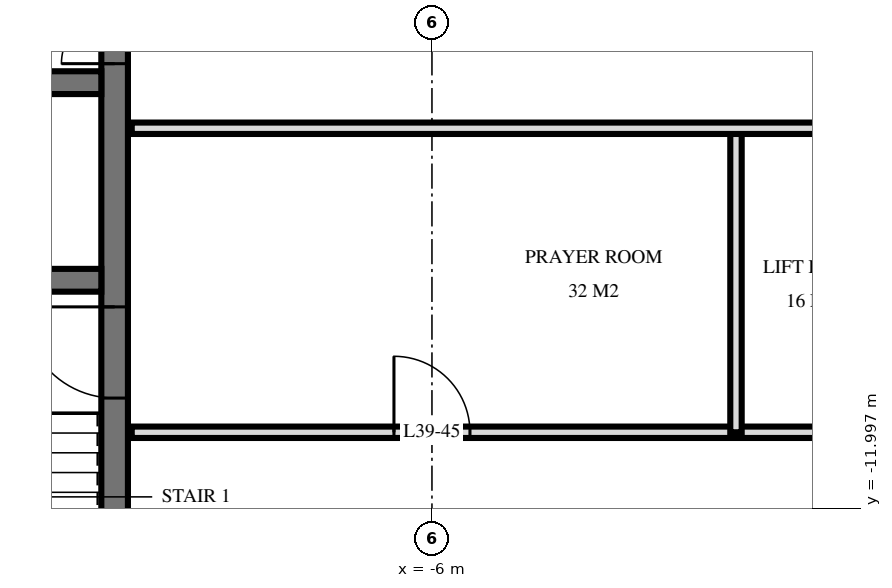
"""IFC4 building model, lengths in metres.
Left out: names, types, materials, properties, quantities, classifications, styles, units other than length and angle.
Written with IfcOpenShell. Run it as: python <this file> out.ifc"""

import sys

from ifc_helpers import new_model, si_unit, direction, frame, frame_2d, origin, place, context, subcontext, project, spatial, rectangle, extrude, element, fill, save


model = new_model("IFC4")
c1 = context("Model", 3, precision=1e-05, world=origin(), true_north=direction((0.0, 1.0)))
c2 = subcontext(c1, "Body", "Model", "MODEL_VIEW")
j1 = project(units=[si_unit("LENGTHUNIT", "METRE"), si_unit("PLANEANGLEUNIT", "RADIAN")], contexts=[c1])
p1 = place(None, origin())
s1 = spatial("IfcSite", under=j1, at=p1, CompositionType="ELEMENT")
p2 = place(p1, origin())
s2 = spatial("IfcBuilding", under=s1, at=p2, CompositionType="ELEMENT")
p3 = place(p2, frame((0.0, 0.0, 152.4)))
s3 = spatial("IfcBuildingStorey", under=s2, at=p3, CompositionType="ELEMENT", Elevation=152.4)
p4 = place(p3, frame((-10.175, -14.55, 0.0), z_axis=(0.0, 0.0, 1.0), x_axis=(0.0, 1.0, 0.0)))
e1 = element("IfcWall", 1, at=p4, inside=s3, PredefinedType="SHEAR", context=c2, shape_type="SweptSolid", body=[
    extrude(rectangle(XDim=14.1, YDim=0.35, at=frame_2d((7.05, 0.0))), origin(), (0.0, 0.0, 1.0), 3.6),
])
p5 = place(p4, frame((8.4, 0.0, 0.0)))
e2 = element("IfcOpeningElement", 2, at=p5, cuts=e1, PredefinedType="OPENING", context=c2, shape_type="SweptSolid", body=[
    extrude(rectangle(XDim=1.4, YDim=2.4, at=frame_2d((0.7, 1.2))), frame((0.0, 0.185, 0.0), z_axis=(0.0, -1.0, 0.0), x_axis=(1.0, 0.0, 0.0)), (0.0, 0.0, 1.0), 0.37),
])
p6 = place(p4, frame((10.0, 0.0, 0.0)))
e3 = element("IfcOpeningElement", 3, at=p6, cuts=e1, PredefinedType="OPENING", context=c2, shape_type="SweptSolid", body=[
    extrude(rectangle(XDim=1.4, YDim=2.4, at=frame_2d((0.7, 1.2))), frame((0.0, 0.185, 0.0), z_axis=(0.0, -1.0, 0.0), x_axis=(1.0, 0.0, 0.0)), (0.0, 0.0, 1.0), 0.37),
])
p7 = place(p4, frame((4.0, 0.0, 0.0)))
e4 = element("IfcOpeningElement", 4, at=p7, cuts=e1, PredefinedType="OPENING", context=c2, shape_type="SweptSolid", body=[
    extrude(rectangle(XDim=1.2, YDim=2.1, at=frame_2d((0.6, 1.05))), frame((0.0, 0.185, 0.0), z_axis=(0.0, -1.0, 0.0), x_axis=(1.0, 0.0, 0.0)), (0.0, 0.0, 1.0), 0.37),
])
p8 = place(p3, frame((-24.05, -6.4, 0.0), z_axis=(0.0, 0.0, 1.0), x_axis=(1.0, 0.0, 0.0)))
e5 = element("IfcWall", 5, at=p8, inside=s3, PredefinedType="SHEAR", context=c2, shape_type="SweptSolid", body=[
    extrude(rectangle(XDim=13.7, YDim=0.3, at=frame_2d((6.85, 0.0))), origin(), (0.0, 0.0, 1.0), 3.6),
])
p9 = place(p8, frame((0.55, 0.0, 0.0)))
e6 = element("IfcOpeningElement", 6, at=p9, cuts=e5, PredefinedType="OPENING", context=c2, shape_type="SweptSolid", body=[
    extrude(rectangle(XDim=1.1, YDim=2.1, at=frame_2d((0.55, 1.05))), frame((0.0, 0.16, 0.0), z_axis=(0.0, -1.0, 0.0), x_axis=(1.0, 0.0, 0.0)), (0.0, 0.0, 1.0), 0.32),
])
p10 = place(p8, frame((5.8, 0.0, 0.0)))
e7 = element("IfcOpeningElement", 7, at=p10, cuts=e5, PredefinedType="OPENING", context=c2, shape_type="SweptSolid", body=[
    extrude(rectangle(XDim=1.1, YDim=2.1, at=frame_2d((0.55, 1.05))), frame((0.0, 0.16, 0.0), z_axis=(0.0, -1.0, 0.0), x_axis=(1.0, 0.0, 0.0)), (0.0, 0.0, 1.0), 0.32),
])
p11 = place(p3, frame((-24.05, -9.0, 0.0), z_axis=(0.0, 0.0, 1.0), x_axis=(1.0, 0.0, 0.0)))
e8 = element("IfcWall", 8, at=p11, inside=s3, PredefinedType="SHEAR", context=c2, shape_type="SweptSolid", body=[
    extrude(rectangle(XDim=13.7, YDim=0.3, at=frame_2d((6.85, 0.0))), origin(), (0.0, 0.0, 1.0), 3.6),
])
p12 = place(p11, frame((8.8, 0.0, 0.0)))
e9 = element("IfcOpeningElement", 9, at=p12, cuts=e8, PredefinedType="OPENING", context=c2, shape_type="SweptSolid", body=[
    extrude(rectangle(XDim=1.1, YDim=2.1, at=frame_2d((0.55, 1.05))), frame((0.0, 0.16, 0.0), z_axis=(0.0, -1.0, 0.0), x_axis=(1.0, 0.0, 0.0)), (0.0, 0.0, 1.0), 0.32),
])
p13 = place(p3, frame((-2.0, -11.0, 0.0), z_axis=(0.0, 0.0, 1.0), x_axis=(0.0, 1.0, 0.0)))
e10 = element("IfcWall", 10, at=p13, inside=s3, PredefinedType="PARTITIONING", context=c2, shape_type="SweptSolid", body=[
    extrude(rectangle(XDim=4.0, YDim=0.15, at=frame_2d((2.0, 0.0))), origin(), (0.0, 0.0, 1.0), 3.32),
])
p14 = place(p3, frame((-9.95, -11.0, 0.0), z_axis=(0.0, 0.0, 1.0), x_axis=(1.0, 0.0, 0.0)))
e11 = element("IfcWall", 11, at=p14, inside=s3, PredefinedType="PARTITIONING", context=c2, shape_type="SweptSolid", body=[
    extrude(rectangle(XDim=19.9, YDim=0.15, at=frame_2d((9.95, 0.0))), origin(), (0.0, 0.0, 1.0), 3.32),
])
p15 = place(p14, frame((9.45, 0.0, 0.0)))
e12 = element("IfcOpeningElement", 12, at=p15, cuts=e11, PredefinedType="OPENING", context=c2, shape_type="SweptSolid", body=[
    extrude(rectangle(XDim=1.0, YDim=2.1, at=frame_2d((0.5, 1.05))), frame((0.0, 0.085, 0.0), z_axis=(0.0, -1.0, 0.0), x_axis=(1.0, 0.0, 0.0)), (0.0, 0.0, 1.0), 0.17),
])
p16 = place(p14, frame((3.45, 0.0, 0.0)))
e13 = element("IfcOpeningElement", 13, at=p16, cuts=e11, PredefinedType="OPENING", context=c2, shape_type="SweptSolid", body=[
    extrude(rectangle(XDim=1.0, YDim=2.1, at=frame_2d((0.5, 1.05))), frame((0.0, 0.085, 0.0), z_axis=(0.0, -1.0, 0.0), x_axis=(1.0, 0.0, 0.0)), (0.0, 0.0, 1.0), 0.17),
])
p17 = place(p3, frame((-9.95, -7.0, 0.0), z_axis=(0.0, 0.0, 1.0), x_axis=(1.0, 0.0, 0.0)))
e14 = element("IfcWall", 14, at=p17, inside=s3, PredefinedType="PARTITIONING", context=c2, shape_type="SweptSolid", body=[
    extrude(rectangle(XDim=19.9, YDim=0.15, at=frame_2d((9.95, 0.0))), origin(), (0.0, 0.0, 1.0), 3.32),
])
p18 = place(p17, frame((9.45, 0.0, 0.0)))
e15 = element("IfcOpeningElement", 15, at=p18, cuts=e14, PredefinedType="OPENING", context=c2, shape_type="SweptSolid", body=[
    extrude(rectangle(XDim=1.0, YDim=2.1, at=frame_2d((0.5, 1.05))), frame((0.0, 0.085, 0.0), z_axis=(0.0, -1.0, 0.0), x_axis=(1.0, 0.0, 0.0)), (0.0, 0.0, 1.0), 0.17),
])
p19 = place(p17, frame((15.45, 0.0, 0.0)))
e16 = element("IfcOpeningElement", 16, at=p19, cuts=e14, PredefinedType="OPENING", context=c2, shape_type="SweptSolid", body=[
    extrude(rectangle(XDim=1.0, YDim=2.1, at=frame_2d((0.5, 1.05))), frame((0.0, 0.085, 0.0), z_axis=(0.0, -1.0, 0.0), x_axis=(1.0, 0.0, 0.0)), (0.0, 0.0, 1.0), 0.17),
])
p20 = place(p5, origin())
e17 = element("IfcDoor", 17, at=p20, inside=s3, OperationType="DOUBLE_DOOR_SINGLE_SWING", PredefinedType="DOOR", context=c2, shape_type="SweptSolid", body=[
    extrude(rectangle(XDim=1.4, YDim=2.4, at=frame_2d((0.7, 1.2))), frame((0.0, 0.025, 0.0), z_axis=(0.0, -1.0, 0.0), x_axis=(1.0, 0.0, 0.0)), (0.0, 0.0, 1.0), 0.05),
])
fill(e2, e17)
p21 = place(p7, origin())
e18 = element("IfcDoor", 18, at=p21, inside=s3, OperationType="SINGLE_SWING_LEFT", PredefinedType="DOOR", context=c2, shape_type="SweptSolid", body=[
    extrude(rectangle(XDim=1.2, YDim=2.1, at=frame_2d((0.6, 1.05))), frame((0.0, 0.025, 0.0), z_axis=(0.0, -1.0, 0.0), x_axis=(1.0, 0.0, 0.0)), (0.0, 0.0, 1.0), 0.05),
])
fill(e4, e18)
p22 = place(p16, origin())
e19 = element("IfcDoor", 19, at=p22, inside=s3, OperationType="SINGLE_SWING_RIGHT", PredefinedType="DOOR", context=c2, shape_type="SweptSolid", body=[
    extrude(rectangle(XDim=1.0, YDim=2.1, at=frame_2d((0.5, 1.05))), frame((0.0, 0.025, 0.0), z_axis=(0.0, -1.0, 0.0), x_axis=(1.0, 0.0, 0.0)), (0.0, 0.0, 1.0), 0.05),
])
fill(e13, e19)
save(model, sys.argv[1])
